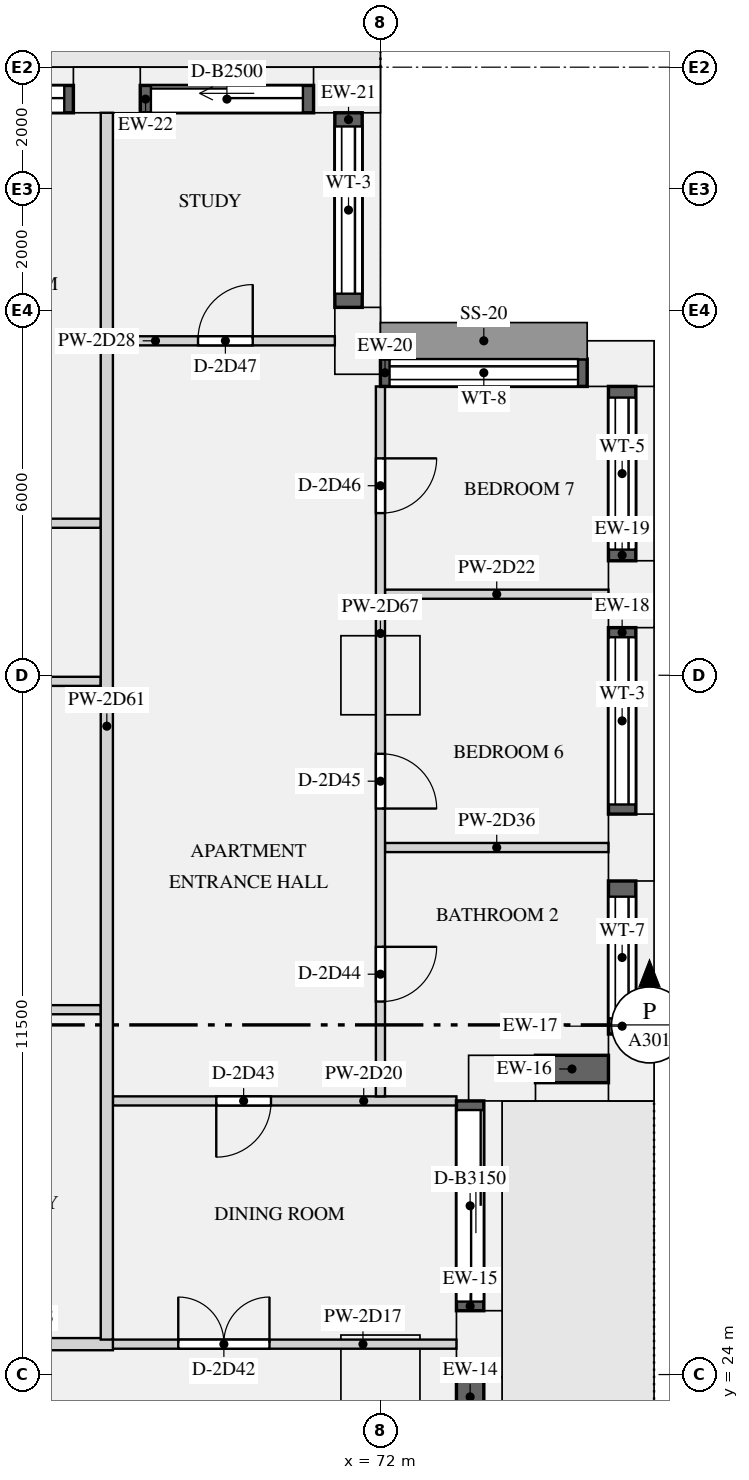
"""IFC4 building model, lengths in metres.
Left out: names, types, materials, properties, quantities, classifications, styles, units other than length and angle.
Written with IfcOpenShell. Run it as: python <this file> out.ifc"""

import sys

from ifc_helpers import new_model, si_unit, direction, frame, frame_2d, origin, origin_2d, place, context, subcontext, project, spatial, rectangle, extrude, element, fill, save


model = new_model("IFC4")
c1 = context("Model", 3, precision=1e-05, world=origin(), true_north=direction((0.0, 1.0)))
c2 = subcontext(c1, "Body", "Model", "MODEL_VIEW")
j1 = project(units=[si_unit("LENGTHUNIT", "METRE"), si_unit("PLANEANGLEUNIT", "RADIAN")], contexts=[c1])
p1 = place(None, origin())
s1 = spatial("IfcSite", under=j1, at=p1, CompositionType="ELEMENT")
p2 = place(p1, origin())
s2 = spatial("IfcBuilding", under=s1, at=p2, CompositionType="ELEMENT")
p3 = place(p2, frame((0.0, 0.0, 111.9)))
s3 = spatial("IfcBuildingStorey", under=s2, at=p3, CompositionType="ELEMENT", Elevation=111.9)
for number, where, z_axis, x_axis in (
    (1, (73.625, 24.5, 0.0), (0.0, 0.0, 1.0), (0.0, 1.0, 0.0)),
    (2, (74.0, 28.875, 0.0), (0.0, 0.0, 1.0), (1.0, 0.0, 0.0)),
    (3, (76.125, 29.05, 0.0), (0.0, 0.0, 1.0), (0.0, 1.0, 0.0)),
    (4, (76.125, 32.667, 0.0), (0.0, 0.0, 1.0), (0.0, 1.0, 0.0)),
    (5, (76.125, 36.833, 0.0), (0.0, 0.0, 1.0), (0.0, 1.0, 0.0)),
    (6, (75.95, 40.625, 0.0), (0.0, 0.0, 1.0), (-1.0, 0.0, 0.0)),
    (7, (71.625, 41.0, 0.0), (0.0, 0.0, 1.0), (0.0, 1.0, 0.0)),
    (8, (71.45, 45.125, 0.0), (0.0, 0.0, 1.0), (-1.0, 0.0, 0.0)),
    (9, (67.5, 45.125, 0.0), (0.0, 0.0, 1.0), (-1.0, 0.0, 0.0)),
):
    element("IfcColumn", number, at=place(p3, frame(where, z_axis=z_axis, x_axis=x_axis)), inside=s3, PredefinedType="USERDEFINED", context=c2, shape_type="SweptSolid", body=[
        extrude(rectangle(XDim=1.1, YDim=0.75, at=origin_2d()), origin(), (0.0, 0.0, 1.0), 3.15),
    ])
for number, where, z_axis, x_axis in (
    (10, (72.0, 24.0, 0.0), (0.0, 0.0, 1.0), (1.0, 0.0, 0.0)),
    (11, (72.0, 35.5, 0.0), (0.0, 0.0, 1.0), (1.0, 0.0, 0.0)),
):
    element("IfcColumn", number, at=place(p3, frame(where, z_axis=z_axis, x_axis=x_axis)), inside=s3, PredefinedType="COLUMN", context=c2, shape_type="SweptSolid", body=[
        extrude(rectangle(XDim=1.3, YDim=1.3, at=origin_2d()), origin(), (0.0, 0.0, 1.0), 3.15),
    ])
p4 = place(p3, frame((73.475, 21.05, 0.0), z_axis=(0.0, 0.0, 1.0), x_axis=(0.0, 1.0, 0.0)))
e12 = element("IfcWall", 12, at=p4, inside=s3, PredefinedType="SOLIDWALL", context=c2, shape_type="SweptSolid", body=[
    extrude(rectangle(XDim=2.9, YDim=0.45, at=frame_2d((1.45, 0.0))), origin(), (0.0, 0.0, 1.0), 2.83),
])
p5 = place(p4, frame((0.165, 0.0, 0.0)))
e13 = element("IfcOpeningElement", 13, at=p5, cuts=e12, PredefinedType="OPENING", context=c2, shape_type="SweptSolid", body=[
    extrude(rectangle(XDim=2.1, YDim=2.3, at=frame_2d((1.05, 1.15))), frame((0.0, 0.235, 0.0), z_axis=(0.0, -1.0, 0.0), x_axis=(1.0, 0.0, 0.0)), (0.0, 0.0, 1.0), 0.47),
])
p6 = place(p3, frame((73.475, 25.05, 0.0), z_axis=(0.0, 0.0, 1.0), x_axis=(0.0, 1.0, 0.0)))
e14 = element("IfcWall", 14, at=p6, inside=s3, PredefinedType="SOLIDWALL", context=c2, shape_type="SweptSolid", body=[
    extrude(rectangle(XDim=3.45, YDim=0.45, at=frame_2d((1.725, 0.0))), origin(), (0.0, 0.0, 1.0), 2.83),
])
p7 = place(p6, frame((0.15, 0.0, 0.0)))
e15 = element("IfcOpeningElement", 15, at=p7, cuts=e14, PredefinedType="OPENING", context=c2, shape_type="SweptSolid", body=[
    extrude(rectangle(XDim=3.15, YDim=2.3, at=frame_2d((1.575, 1.15))), frame((0.0, 0.235, 0.0), z_axis=(0.0, -1.0, 0.0), x_axis=(1.0, 0.0, 0.0)), (0.0, 0.0, 1.0), 0.47),
])
p8 = place(p3, frame((74.55, 29.025, 0.9), z_axis=(0.0, 0.0, 1.0), x_axis=(1.0, 0.0, 0.0)))
e16 = element("IfcWall", 16, at=p8, inside=s3, PredefinedType="SOLIDWALL", context=c2, shape_type="SweptSolid", body=[
    extrude(rectangle(XDim=1.2, YDim=0.45, at=frame_2d((0.6, 0.0))), origin(), (0.0, 0.0, 1.0), 1.93),
])
p9 = place(p3, frame((75.975, 29.6, 0.9), z_axis=(0.0, 0.0, 1.0), x_axis=(0.0, 1.0, 0.0)))
e17 = element("IfcWall", 17, at=p9, inside=s3, PredefinedType="SOLIDWALL", context=c2, shape_type="SweptSolid", body=[
    extrude(rectangle(XDim=2.517, YDim=0.45, at=frame_2d((1.258, 0.0))), origin(), (0.0, 0.0, 1.0), 1.93),
])
p10 = place(p9, frame((0.259, 0.0, 0.15)))
e18 = element("IfcOpeningElement", 18, at=p10, cuts=e17, PredefinedType="OPENING", context=c2, shape_type="SweptSolid", body=[
    extrude(rectangle(XDim=2.0, YDim=1.5, at=frame_2d((1.0, 0.75))), frame((0.0, 0.235, 0.0), z_axis=(0.0, -1.0, 0.0), x_axis=(1.0, 0.0, 0.0)), (0.0, 0.0, 1.0), 0.47),
])
p11 = place(p3, frame((75.975, 33.217, 0.9), z_axis=(0.0, 0.0, 1.0), x_axis=(0.0, 1.0, 0.0)))
e19 = element("IfcWall", 19, at=p11, inside=s3, PredefinedType="SOLIDWALL", context=c2, shape_type="SweptSolid", body=[
    extrude(rectangle(XDim=3.066, YDim=0.45, at=frame_2d((1.533, 0.0))), origin(), (0.0, 0.0, 1.0), 1.93),
])
p12 = place(p11, frame((0.158, 0.0, 0.15)))
e20 = element("IfcOpeningElement", 20, at=p12, cuts=e19, PredefinedType="OPENING", context=c2, shape_type="SweptSolid", body=[
    extrude(rectangle(XDim=2.75, YDim=1.5, at=frame_2d((1.375, 0.75))), frame((0.0, 0.235, 0.0), z_axis=(0.0, -1.0, 0.0), x_axis=(1.0, 0.0, 0.0)), (0.0, 0.0, 1.0), 0.47),
])
p13 = place(p3, frame((75.975, 37.383, 0.9), z_axis=(0.0, 0.0, 1.0), x_axis=(0.0, 1.0, 0.0)))
e21 = element("IfcWall", 21, at=p13, inside=s3, PredefinedType="SOLIDWALL", context=c2, shape_type="SweptSolid", body=[
    extrude(rectangle(XDim=2.867, YDim=0.45, at=frame_2d((1.434, 0.0))), origin(), (0.0, 0.0, 1.0), 1.93),
])
p14 = place(p13, frame((0.184, 0.0, 0.15)))
e22 = element("IfcOpeningElement", 22, at=p14, cuts=e21, PredefinedType="OPENING", context=c2, shape_type="SweptSolid", body=[
    extrude(rectangle(XDim=2.5, YDim=1.5, at=frame_2d((1.25, 0.75))), frame((0.0, 0.235, 0.0), z_axis=(0.0, -1.0, 0.0), x_axis=(1.0, 0.0, 0.0)), (0.0, 0.0, 1.0), 0.47),
])
p15 = place(p3, frame((75.4, 40.475, 0.9), z_axis=(0.0, 0.0, 1.0), x_axis=(-1.0, 0.0, 0.0)))
e23 = element("IfcWall", 23, at=p15, inside=s3, PredefinedType="SOLIDWALL", context=c2, shape_type="SweptSolid", body=[
    extrude(rectangle(XDim=3.4, YDim=0.45, at=frame_2d((1.7, 0.0))), origin(), (0.0, 0.0, 1.0), 1.93),
])
p16 = place(p15, frame((0.15, 0.0, 0.15)))
e24 = element("IfcOpeningElement", 24, at=p16, cuts=e23, PredefinedType="OPENING", context=c2, shape_type="SweptSolid", body=[
    extrude(rectangle(XDim=3.1, YDim=1.5, at=frame_2d((1.55, 0.75))), frame((0.0, 0.235, 0.0), z_axis=(0.0, -1.0, 0.0), x_axis=(1.0, 0.0, 0.0)), (0.0, 0.0, 1.0), 0.47),
])
p17 = place(p3, frame((71.475, 41.55, 0.9), z_axis=(0.0, 0.0, 1.0), x_axis=(0.0, 1.0, 0.0)))
e25 = element("IfcWall", 25, at=p17, inside=s3, PredefinedType="SOLIDWALL", context=c2, shape_type="SweptSolid", body=[
    extrude(rectangle(XDim=3.2, YDim=0.45, at=frame_2d((1.6, 0.0))), origin(), (0.0, 0.0, 1.0), 1.93),
])
p18 = place(p17, frame((0.225, 0.0, 0.15)))
e26 = element("IfcOpeningElement", 26, at=p18, cuts=e25, PredefinedType="OPENING", context=c2, shape_type="SweptSolid", body=[
    extrude(rectangle(XDim=2.75, YDim=1.5, at=frame_2d((1.375, 0.75))), frame((0.0, 0.235, 0.0), z_axis=(0.0, -1.0, 0.0), x_axis=(1.0, 0.0, 0.0)), (0.0, 0.0, 1.0), 0.47),
])
p19 = place(p3, frame((70.9, 44.975, 0.0), z_axis=(0.0, 0.0, 1.0), x_axis=(-1.0, 0.0, 0.0)))
e27 = element("IfcWall", 27, at=p19, inside=s3, PredefinedType="SOLIDWALL", context=c2, shape_type="SweptSolid", body=[
    extrude(rectangle(XDim=2.85, YDim=0.45, at=frame_2d((1.425, 0.0))), origin(), (0.0, 0.0, 1.0), 2.83),
])
p20 = place(p19, frame((0.175, 0.0, 0.0)))
e28 = element("IfcOpeningElement", 28, at=p20, cuts=e27, PredefinedType="OPENING", context=c2, shape_type="SweptSolid", body=[
    extrude(rectangle(XDim=2.5, YDim=2.3, at=frame_2d((1.25, 1.15))), frame((0.0, 0.235, 0.0), z_axis=(0.0, -1.0, 0.0), x_axis=(1.0, 0.0, 0.0)), (0.0, 0.0, 1.0), 0.47),
])
p21 = place(p3, frame((66.95, 44.975, 0.0), z_axis=(0.0, 0.0, 1.0), x_axis=(-1.0, 0.0, 0.0)))
e29 = element("IfcWall", 29, at=p21, inside=s3, PredefinedType="SOLIDWALL", context=c2, shape_type="SweptSolid", body=[
    extrude(rectangle(XDim=3.4, YDim=0.45, at=frame_2d((1.7, 0.0))), origin(), (0.0, 0.0, 1.0), 2.83),
])
p22 = place(p21, frame((0.15, 0.0, 0.0)))
e30 = element("IfcOpeningElement", 30, at=p22, cuts=e29, PredefinedType="OPENING", context=c2, shape_type="SweptSolid", body=[
    extrude(rectangle(XDim=3.1, YDim=2.3, at=frame_2d((1.55, 1.15))), frame((0.0, 0.235, 0.0), z_axis=(0.0, -1.0, 0.0), x_axis=(1.0, 0.0, 0.0)), (0.0, 0.0, 1.0), 0.47),
])
p23 = place(p3, frame((67.4, 24.5, 0.0), z_axis=(0.0, 0.0, 1.0), x_axis=(1.0, 0.0, 0.0)))
e31 = element("IfcWall", 31, at=p23, inside=s3, PredefinedType="PARTITIONING", context=c2, shape_type="SweptSolid", body=[
    extrude(rectangle(XDim=5.85, YDim=0.15, at=frame_2d((2.925, 0.0))), origin(), (0.0, 0.0, 1.0), 2.83),
])
p24 = place(p23, frame((1.275, 0.0, 0.0)))
e32 = element("IfcOpeningElement", 32, at=p24, cuts=e31, PredefinedType="OPENING", context=c2, shape_type="SweptSolid", body=[
    extrude(rectangle(XDim=1.5, YDim=2.1, at=frame_2d((0.75, 1.05))), frame((0.0, 0.085, 0.0), z_axis=(0.0, -1.0, 0.0), x_axis=(1.0, 0.0, 0.0)), (0.0, 0.0, 1.0), 0.17),
])
p25 = place(p3, frame((64.4, 24.5, 0.0), z_axis=(0.0, 0.0, 1.0), x_axis=(1.0, 0.0, 0.0)))
e33 = element("IfcWall", 33, at=p25, inside=s3, PredefinedType="PARTITIONING", context=c2, shape_type="SweptSolid", body=[
    extrude(rectangle(XDim=3.2, YDim=0.2, at=frame_2d((1.6, 0.0))), origin(), (0.0, 0.0, 1.0), 2.83),
])
p26 = place(p3, frame((67.6, 28.5, 0.0), z_axis=(0.0, 0.0, 1.0), x_axis=(1.0, 0.0, 0.0)))
e34 = element("IfcWall", 34, at=p26, inside=s3, PredefinedType="PARTITIONING", context=c2, shape_type="SweptSolid", body=[
    extrude(rectangle(XDim=5.65, YDim=0.15, at=frame_2d((2.825, 0.0))), origin(), (0.0, 0.0, 1.0), 2.83),
])
p27 = place(p26, frame((1.7, 0.0, 0.0)))
e35 = element("IfcOpeningElement", 35, at=p27, cuts=e34, PredefinedType="OPENING", context=c2, shape_type="SweptSolid", body=[
    extrude(rectangle(XDim=0.9, YDim=2.1, at=frame_2d((0.45, 1.05))), frame((0.0, 0.085, 0.0), z_axis=(0.0, -1.0, 0.0), x_axis=(1.0, 0.0, 0.0)), (0.0, 0.0, 1.0), 0.17),
])
p28 = place(p3, frame((72.075, 36.833, 0.0), z_axis=(0.0, 0.0, 1.0), x_axis=(1.0, 0.0, 0.0)))
e36 = element("IfcWall", 36, at=p28, inside=s3, PredefinedType="PARTITIONING", context=c2, shape_type="SweptSolid", body=[
    extrude(rectangle(XDim=3.675, YDim=0.15, at=frame_2d((1.837, 0.0))), origin(), (0.0, 0.0, 1.0), 2.83),
])
p29 = place(p3, frame((59.8, 35.4, 0.0), z_axis=(0.0, 0.0, 1.0), x_axis=(1.0, 0.0, 0.0)))
e37 = element("IfcWall", 37, at=p29, inside=s3, PredefinedType="PARTITIONING", context=c2, shape_type="SweptSolid", body=[
    extrude(rectangle(XDim=7.6, YDim=0.15, at=frame_2d((3.8, 0.0))), origin(), (0.0, 0.0, 1.0), 2.83),
])
p30 = place(p29, frame((5.325, 0.0, 0.0)))
e38 = element("IfcOpeningElement", 38, at=p30, cuts=e37, PredefinedType="OPENING", context=c2, shape_type="SweptSolid", body=[
    extrude(rectangle(XDim=0.9, YDim=2.1, at=frame_2d((0.45, 1.05))), frame((0.0, 0.085, 0.0), z_axis=(0.0, -1.0, 0.0), x_axis=(1.0, 0.0, 0.0)), (0.0, 0.0, 1.0), 0.17),
])
p31 = place(p3, frame((67.6, 41.0, 0.0), z_axis=(0.0, 0.0, 1.0), x_axis=(1.0, 0.0, 0.0)))
e39 = element("IfcWall", 39, at=p31, inside=s3, PredefinedType="PARTITIONING", context=c2, shape_type="SweptSolid", body=[
    extrude(rectangle(XDim=3.65, YDim=0.15, at=frame_2d((1.825, 0.0))), origin(), (0.0, 0.0, 1.0), 2.83),
])
p32 = place(p31, frame((1.4, 0.0, 0.0)))
e40 = element("IfcOpeningElement", 40, at=p32, cuts=e39, PredefinedType="OPENING", context=c2, shape_type="SweptSolid", body=[
    extrude(rectangle(XDim=0.9, YDim=2.1, at=frame_2d((0.45, 1.05))), frame((0.0, 0.085, 0.0), z_axis=(0.0, -1.0, 0.0), x_axis=(1.0, 0.0, 0.0)), (0.0, 0.0, 1.0), 0.17),
])
p33 = place(p3, frame((62.925, 38.0, 0.0), z_axis=(0.0, 0.0, 1.0), x_axis=(1.0, 0.0, 0.0)))
e41 = element("IfcWall", 41, at=p33, inside=s3, PredefinedType="PARTITIONING", context=c2, shape_type="SweptSolid", body=[
    extrude(rectangle(XDim=4.475, YDim=0.15, at=frame_2d((2.237, 0.0))), origin(), (0.0, 0.0, 1.0), 2.83),
])
p34 = place(p33, frame((1.875, 0.0, 0.0)))
e42 = element("IfcOpeningElement", 42, at=p34, cuts=e41, PredefinedType="OPENING", context=c2, shape_type="SweptSolid", body=[
    extrude(rectangle(XDim=0.9, YDim=2.1, at=frame_2d((0.45, 1.05))), frame((0.0, 0.085, 0.0), z_axis=(0.0, -1.0, 0.0), x_axis=(1.0, 0.0, 0.0)), (0.0, 0.0, 1.0), 0.17),
])
p35 = place(p3, frame((59.8, 30.0, 0.0), z_axis=(0.0, 0.0, 1.0), x_axis=(1.0, 0.0, 0.0)))
e43 = element("IfcWall", 43, at=p35, inside=s3, PredefinedType="PARTITIONING", context=c2, shape_type="SweptSolid", body=[
    extrude(rectangle(XDim=7.6, YDim=0.15, at=frame_2d((3.8, 0.0))), origin(), (0.0, 0.0, 1.0), 2.83),
])
p36 = place(p35, frame((1.9, 0.0, 0.0)))
e44 = element("IfcOpeningElement", 44, at=p36, cuts=e43, PredefinedType="OPENING", context=c2, shape_type="SweptSolid", body=[
    extrude(rectangle(XDim=0.9, YDim=2.1, at=frame_2d((0.45, 1.05))), frame((0.0, 0.085, 0.0), z_axis=(0.0, -1.0, 0.0), x_axis=(1.0, 0.0, 0.0)), (0.0, 0.0, 1.0), 0.17),
])
p37 = place(p3, frame((72.075, 32.667, 0.0), z_axis=(0.0, 0.0, 1.0), x_axis=(1.0, 0.0, 0.0)))
e45 = element("IfcWall", 45, at=p37, inside=s3, PredefinedType="PARTITIONING", context=c2, shape_type="SweptSolid", body=[
    extrude(rectangle(XDim=3.675, YDim=0.15, at=frame_2d((1.837, 0.0))), origin(), (0.0, 0.0, 1.0), 2.83),
])
p38 = place(p3, frame((67.5, 24.575, 0.0), z_axis=(0.0, 0.0, 1.0), x_axis=(0.0, 1.0, 0.0)))
e46 = element("IfcWall", 46, at=p38, inside=s3, PredefinedType="PARTITIONING", context=c2, shape_type="SweptSolid", body=[
    extrude(rectangle(XDim=20.175, YDim=0.2, at=frame_2d((10.087, 0.0))), origin(), (0.0, 0.0, 1.0), 2.83),
])
p39 = place(p3, frame((72.0, 28.575, 0.0), z_axis=(0.0, 0.0, 1.0), x_axis=(0.0, 1.0, 0.0)))
e47 = element("IfcWall", 47, at=p39, inside=s3, PredefinedType="PARTITIONING", context=c2, shape_type="SweptSolid", body=[
    extrude(rectangle(XDim=11.675, YDim=0.15, at=frame_2d((5.837, 0.0))), origin(), (0.0, 0.0, 1.0), 2.83),
])
p40 = place(p39, frame((1.559, 0.0, 0.0)))
e48 = element("IfcOpeningElement", 48, at=p40, cuts=e47, PredefinedType="OPENING", context=c2, shape_type="SweptSolid", body=[
    extrude(rectangle(XDim=0.9, YDim=2.1, at=frame_2d((0.45, 1.05))), frame((0.0, 0.085, 0.0), z_axis=(0.0, -1.0, 0.0), x_axis=(1.0, 0.0, 0.0)), (0.0, 0.0, 1.0), 0.17),
])
p41 = place(p39, frame((4.733, 0.0, 0.0)))
e49 = element("IfcOpeningElement", 49, at=p41, cuts=e47, PredefinedType="OPENING", context=c2, shape_type="SweptSolid", body=[
    extrude(rectangle(XDim=0.9, YDim=2.1, at=frame_2d((0.45, 1.05))), frame((0.0, 0.085, 0.0), z_axis=(0.0, -1.0, 0.0), x_axis=(1.0, 0.0, 0.0)), (0.0, 0.0, 1.0), 0.17),
])
p42 = place(p39, frame((9.592, 0.0, 0.0)))
e50 = element("IfcOpeningElement", 50, at=p42, cuts=e47, PredefinedType="OPENING", context=c2, shape_type="SweptSolid", body=[
    extrude(rectangle(XDim=0.9, YDim=2.1, at=frame_2d((0.45, 1.05))), frame((0.0, 0.085, 0.0), z_axis=(0.0, -1.0, 0.0), x_axis=(1.0, 0.0, 0.0)), (0.0, 0.0, 1.0), 0.17),
])
p43 = place(p7, origin())
e51 = element("IfcDoor", 51, at=p43, inside=s3, OperationType="SLIDING_TO_LEFT", PredefinedType="DOOR", context=c2, shape_type="SweptSolid", body=[
    extrude(rectangle(XDim=3.15, YDim=2.3, at=frame_2d((1.575, 1.15))), frame((0.0, -0.07, 0.0), z_axis=(0.0, -1.0, 0.0), x_axis=(1.0, 0.0, 0.0)), (0.0, 0.0, 1.0), 0.05),
])
fill(e15, e51)
p44 = place(p10, origin())
e52 = element("IfcWindow", 52, at=p44, inside=s3, PartitioningType="SINGLE_PANEL", PredefinedType="WINDOW", context=c2, shape_type="SweptSolid", body=[
    extrude(rectangle(XDim=2.0, YDim=1.5, at=frame_2d((1.0, 0.75))), frame((0.0, -0.065, 0.0), z_axis=(0.0, -1.0, 0.0), x_axis=(1.0, 0.0, 0.0)), (0.0, 0.0, 1.0), 0.06),
])
fill(e18, e52)
p45 = place(p12, origin())
e53 = element("IfcWindow", 53, at=p45, inside=s3, PartitioningType="SINGLE_PANEL", PredefinedType="WINDOW", context=c2, shape_type="SweptSolid", body=[
    extrude(rectangle(XDim=2.75, YDim=1.5, at=frame_2d((1.375, 0.75))), frame((0.0, -0.065, 0.0), z_axis=(0.0, -1.0, 0.0), x_axis=(1.0, 0.0, 0.0)), (0.0, 0.0, 1.0), 0.06),
])
fill(e20, e53)
p46 = place(p14, origin())
e54 = element("IfcWindow", 54, at=p46, inside=s3, PartitioningType="SINGLE_PANEL", PredefinedType="WINDOW", context=c2, shape_type="SweptSolid", body=[
    extrude(rectangle(XDim=2.5, YDim=1.5, at=frame_2d((1.25, 0.75))), frame((0.0, -0.065, 0.0), z_axis=(0.0, -1.0, 0.0), x_axis=(1.0, 0.0, 0.0)), (0.0, 0.0, 1.0), 0.06),
])
fill(e22, e54)
p47 = place(p16, origin())
e55 = element("IfcWindow", 55, at=p47, inside=s3, PartitioningType="SINGLE_PANEL", PredefinedType="WINDOW", context=c2, shape_type="SweptSolid", body=[
    extrude(rectangle(XDim=3.1, YDim=1.5, at=frame_2d((1.55, 0.75))), frame((0.0, -0.065, 0.0), z_axis=(0.0, -1.0, 0.0), x_axis=(1.0, 0.0, 0.0)), (0.0, 0.0, 1.0), 0.06),
])
fill(e24, e55)
p48 = place(p18, origin())
e56 = element("IfcWindow", 56, at=p48, inside=s3, PartitioningType="SINGLE_PANEL", PredefinedType="WINDOW", context=c2, shape_type="SweptSolid", body=[
    extrude(rectangle(XDim=2.75, YDim=1.5, at=frame_2d((1.375, 0.75))), frame((0.0, -0.065, 0.0), z_axis=(0.0, -1.0, 0.0), x_axis=(1.0, 0.0, 0.0)), (0.0, 0.0, 1.0), 0.06),
])
fill(e26, e56)
p49 = place(p20, origin())
e57 = element("IfcDoor", 57, at=p49, inside=s3, OperationType="SLIDING_TO_LEFT", PredefinedType="DOOR", context=c2, shape_type="SweptSolid", body=[
    extrude(rectangle(XDim=2.5, YDim=2.3, at=frame_2d((1.25, 1.15))), frame((0.0, -0.07, 0.0), z_axis=(0.0, -1.0, 0.0), x_axis=(1.0, 0.0, 0.0)), (0.0, 0.0, 1.0), 0.05),
])
fill(e28, e57)
p50 = place(p22, origin())
e58 = element("IfcDoor", 58, at=p50, inside=s3, OperationType="SLIDING_TO_LEFT", PredefinedType="DOOR", context=c2, shape_type="SweptSolid", body=[
    extrude(rectangle(XDim=3.1, YDim=2.3, at=frame_2d((1.55, 1.15))), frame((0.0, -0.07, 0.0), z_axis=(0.0, -1.0, 0.0), x_axis=(1.0, 0.0, 0.0)), (0.0, 0.0, 1.0), 0.05),
])
fill(e30, e58)
p51 = place(p24, origin())
e59 = element("IfcDoor", 59, at=p51, inside=s3, OperationType="DOUBLE_DOOR_SINGLE_SWING", PredefinedType="DOOR", context=c2, shape_type="SweptSolid", body=[
    extrude(rectangle(XDim=1.5, YDim=2.1, at=frame_2d((0.75, 1.05))), frame((0.0, 0.025, 0.0), z_axis=(0.0, -1.0, 0.0), x_axis=(1.0, 0.0, 0.0)), (0.0, 0.0, 1.0), 0.05),
])
fill(e32, e59)
p52 = place(p27, frame((0.9, 0.0, 0.0), z_axis=(0.0, 0.0, 1.0), x_axis=(-1.0, 0.0, 0.0)))
e60 = element("IfcDoor", 60, at=p52, inside=s3, OperationType="SINGLE_SWING_RIGHT", PredefinedType="DOOR", context=c2, shape_type="SweptSolid", body=[
    extrude(rectangle(XDim=0.9, YDim=2.1, at=frame_2d((0.45, 1.05))), frame((0.0, 0.025, 0.0), z_axis=(0.0, -1.0, 0.0), x_axis=(1.0, 0.0, 0.0)), (0.0, 0.0, 1.0), 0.05),
])
fill(e35, e60)
p53 = place(p40, frame((0.9, 0.0, 0.0), z_axis=(0.0, 0.0, 1.0), x_axis=(-1.0, 0.0, 0.0)))
e61 = element("IfcDoor", 61, at=p53, inside=s3, OperationType="SINGLE_SWING_LEFT", PredefinedType="DOOR", context=c2, shape_type="SweptSolid", body=[
    extrude(rectangle(XDim=0.9, YDim=2.1, at=frame_2d((0.45, 1.05))), frame((0.0, 0.025, 0.0), z_axis=(0.0, -1.0, 0.0), x_axis=(1.0, 0.0, 0.0)), (0.0, 0.0, 1.0), 0.05),
])
fill(e48, e61)
p54 = place(p41, frame((0.9, 0.0, 0.0), z_axis=(0.0, 0.0, 1.0), x_axis=(-1.0, 0.0, 0.0)))
e62 = element("IfcDoor", 62, at=p54, inside=s3, OperationType="SINGLE_SWING_RIGHT", PredefinedType="DOOR", context=c2, shape_type="SweptSolid", body=[
    extrude(rectangle(XDim=0.9, YDim=2.1, at=frame_2d((0.45, 1.05))), frame((0.0, 0.025, 0.0), z_axis=(0.0, -1.0, 0.0), x_axis=(1.0, 0.0, 0.0)), (0.0, 0.0, 1.0), 0.05),
])
fill(e49, e62)
p55 = place(p42, frame((0.9, 0.0, 0.0), z_axis=(0.0, 0.0, 1.0), x_axis=(-1.0, 0.0, 0.0)))
e63 = element("IfcDoor", 63, at=p55, inside=s3, OperationType="SINGLE_SWING_LEFT", PredefinedType="DOOR", context=c2, shape_type="SweptSolid", body=[
    extrude(rectangle(XDim=0.9, YDim=2.1, at=frame_2d((0.45, 1.05))), frame((0.0, 0.025, 0.0), z_axis=(0.0, -1.0, 0.0), x_axis=(1.0, 0.0, 0.0)), (0.0, 0.0, 1.0), 0.05),
])
fill(e50, e63)
p56 = place(p32, origin())
e64 = element("IfcDoor", 64, at=p56, inside=s3, OperationType="SINGLE_SWING_RIGHT", PredefinedType="DOOR", context=c2, shape_type="SweptSolid", body=[
    extrude(rectangle(XDim=0.9, YDim=2.1, at=frame_2d((0.45, 1.05))), frame((0.0, 0.025, 0.0), z_axis=(0.0, -1.0, 0.0), x_axis=(1.0, 0.0, 0.0)), (0.0, 0.0, 1.0), 0.05),
])
fill(e40, e64)
save(model, sys.argv[1])
